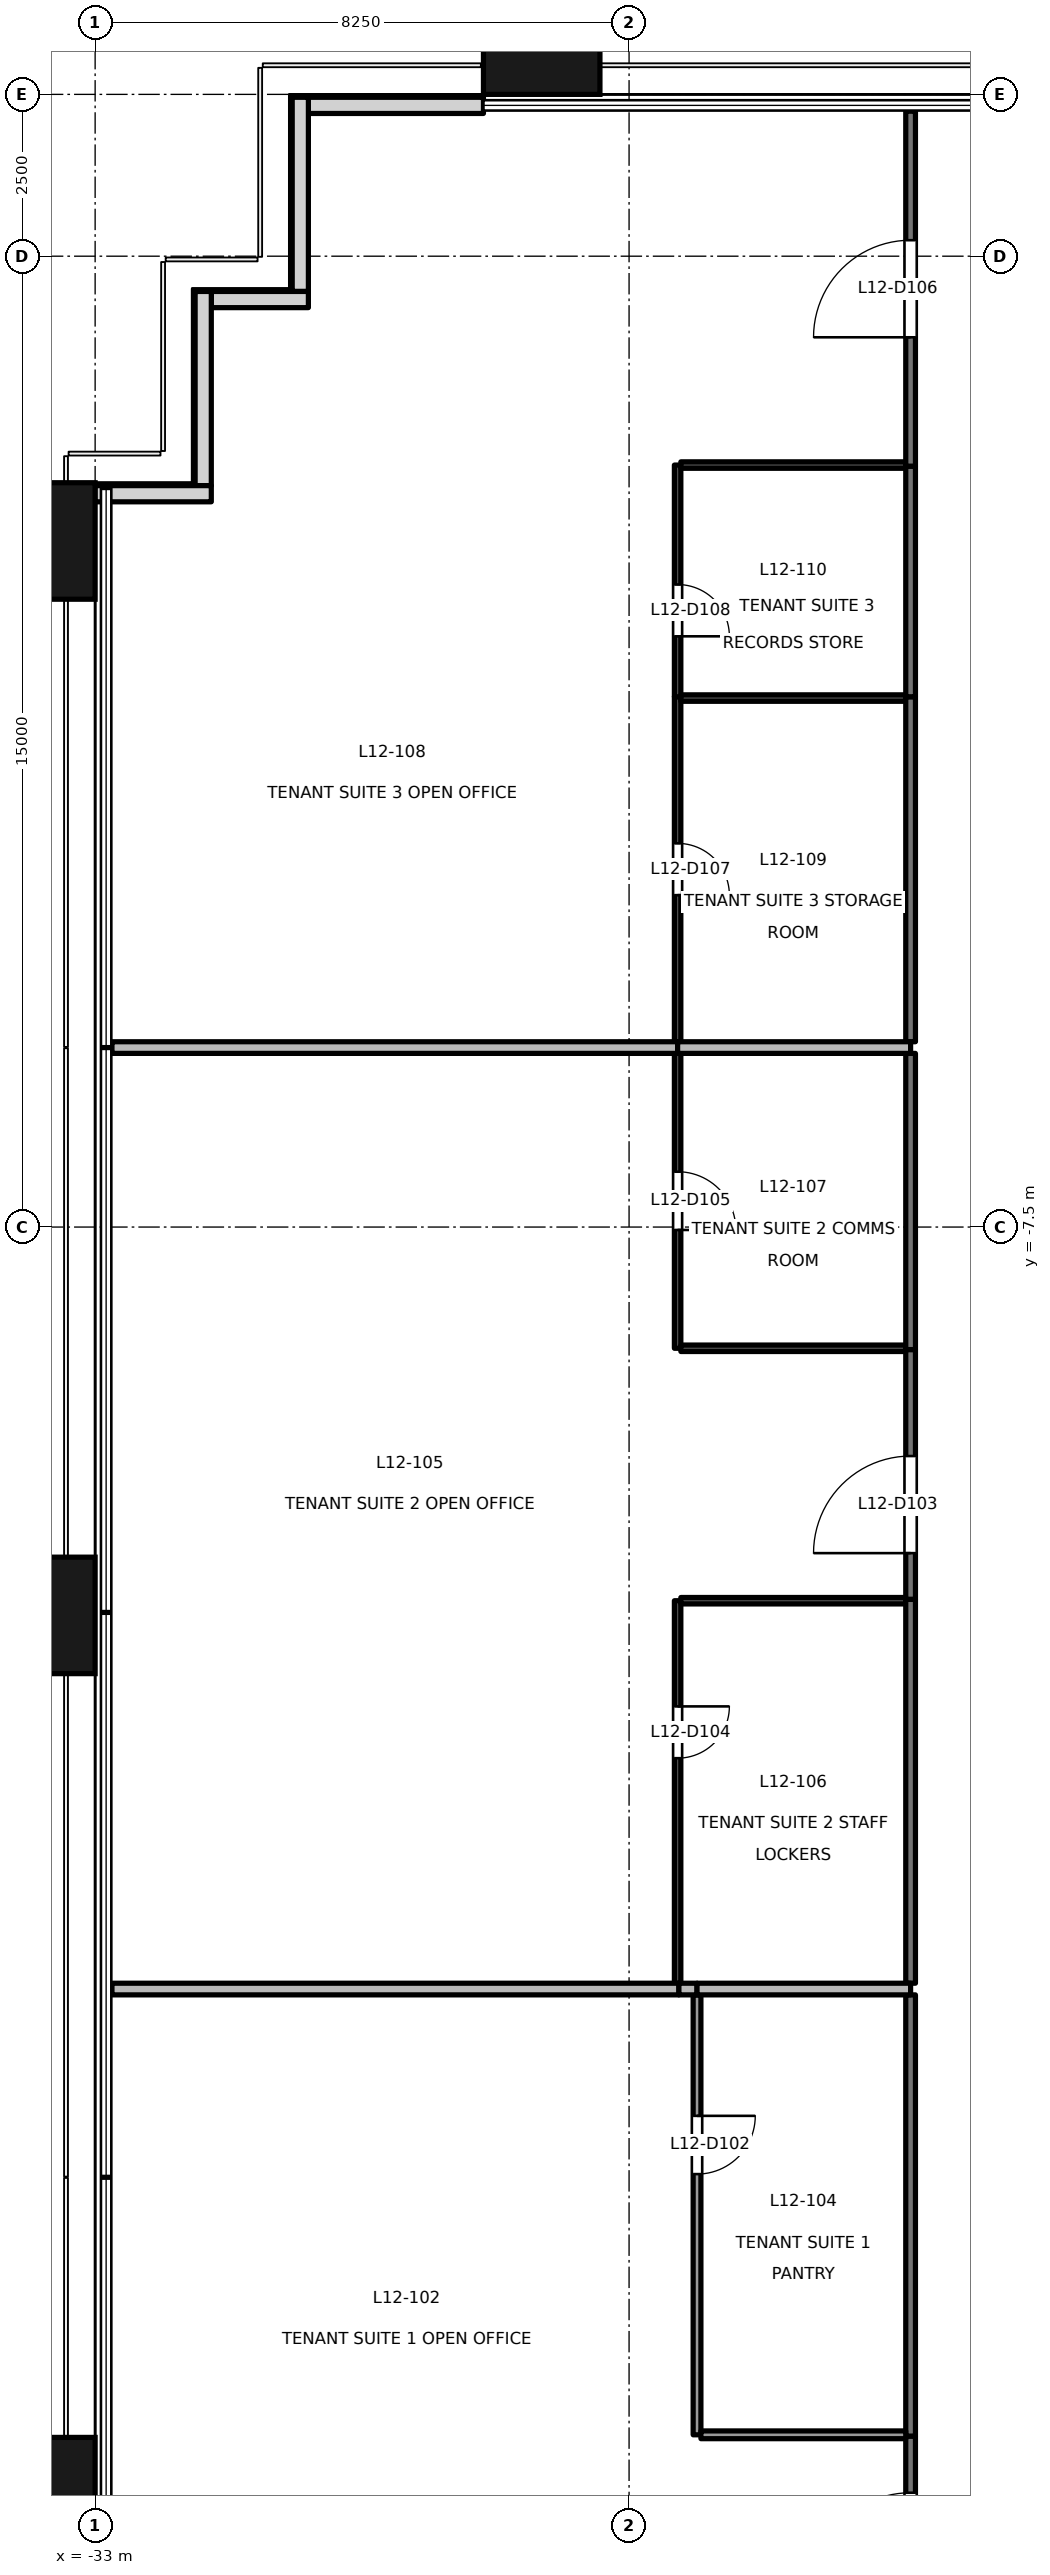
"""IFC4 building model, lengths in metres.
Left out: names, types, materials, properties, quantities, classifications, styles, units other than length and angle.
Written with IfcOpenShell. Run it as: python <this file> out.ifc"""

import sys

from ifc_helpers import new_model, si_unit, direction, frame, frame_2d, origin, origin_2d, place, context, subcontext, project, spatial, rectangle, extrude, element, fill, save


model = new_model("IFC4")
c1 = context("Model", 3, precision=1e-05, world=origin(), true_north=direction((0.0, 1.0)))
c2 = subcontext(c1, "Body", "Model", "MODEL_VIEW")
j1 = project(units=[si_unit("LENGTHUNIT", "METRE"), si_unit("PLANEANGLEUNIT", "RADIAN")], contexts=[c1])
p1 = place(None, origin())
s1 = spatial("IfcSite", under=j1, at=p1, CompositionType="ELEMENT")
p2 = place(p1, origin())
s2 = spatial("IfcBuilding", under=s1, at=p2, CompositionType="ELEMENT")
p3 = place(p2, frame((0.0, 0.0, 57.0)))
s3 = spatial("IfcBuildingStorey", under=s2, at=p3, CompositionType="ELEMENT", Elevation=57.0)
for number, where, z_axis, x_axis in (
    (1, (-33.9, -27.1, -0.2), (0.0, 0.0, 1.0), (0.0, 1.0, 0.0)),
    (2, (-33.9, -13.5, -0.2), (0.0, 0.0, 1.0), (0.0, 1.0, 0.0)),
    (3, (-33.9, 3.1, -0.2), (0.0, 0.0, 1.0), (0.0, 1.0, 0.0)),
    (4, (-26.1, 10.9, -0.2), (0.0, 0.0, 1.0), (1.0, 0.0, 0.0)),
):
    element("IfcColumn", number, at=place(p3, frame(where, z_axis=z_axis, x_axis=x_axis)), inside=s3, PredefinedType="COLUMN", context=c2, shape_type="SweptSolid", body=[
        extrude(rectangle(XDim=1.8, YDim=1.8, at=origin_2d()), origin(), (0.0, 0.0, 1.0), 4.1),
    ])
p4 = place(p3, frame((-27.0, 9.83, 0.0), z_axis=(0.0, 0.0, 1.0), x_axis=(-1.0, 0.0, 0.0)))
e5 = element("IfcWall", 5, at=p4, inside=s3, PredefinedType="SOLIDWALL", context=c2, shape_type="SweptSolid", body=[
    extrude(rectangle(XDim=2.705, YDim=0.25, at=frame_2d((1.353, 0.0))), origin(), (0.0, 0.0, 1.0), 3.9),
])
p5 = place(p3, frame((-29.83, 9.955, 0.0), z_axis=(0.0, 0.0, 1.0), x_axis=(0.0, -1.0, 0.0)))
e6 = element("IfcWall", 6, at=p5, inside=s3, PredefinedType="SOLIDWALL", context=c2, shape_type="SweptSolid", body=[
    extrude(rectangle(XDim=3.0, YDim=0.25, at=frame_2d((1.5, 0.0))), origin(), (0.0, 0.0, 1.0), 3.9),
])
p6 = place(p3, frame((-29.705, 6.83, 0.0), z_axis=(0.0, 0.0, 1.0), x_axis=(-1.0, 0.0, 0.0)))
e7 = element("IfcWall", 7, at=p6, inside=s3, PredefinedType="SOLIDWALL", context=c2, shape_type="SweptSolid", body=[
    extrude(rectangle(XDim=1.5, YDim=0.25, at=frame_2d((0.75, 0.0))), origin(), (0.0, 0.0, 1.0), 3.9),
])
p7 = place(p3, frame((-31.33, 6.955, 0.0), z_axis=(0.0, 0.0, 1.0), x_axis=(0.0, -1.0, 0.0)))
e8 = element("IfcWall", 8, at=p7, inside=s3, PredefinedType="SOLIDWALL", context=c2, shape_type="SweptSolid", body=[
    extrude(rectangle(XDim=3.0, YDim=0.25, at=frame_2d((1.5, 0.0))), origin(), (0.0, 0.0, 1.0), 3.9),
])
p8 = place(p3, frame((-31.205, 3.83, 0.0), z_axis=(0.0, 0.0, 1.0), x_axis=(-1.0, 0.0, 0.0)))
e9 = element("IfcWall", 9, at=p8, inside=s3, PredefinedType="SOLIDWALL", context=c2, shape_type="SweptSolid", body=[
    extrude(rectangle(XDim=1.8, YDim=0.25, at=frame_2d((0.9, 0.0))), origin(), (0.0, 0.0, 1.0), 3.9),
])
p9 = place(p3, frame((-20.4, -30.68, 0.0), z_axis=(0.0, 0.0, 1.0), x_axis=(0.0, 1.0, 0.0)))
e10 = element("IfcWall", 10, at=p9, inside=s3, PredefinedType="PARTITIONING", context=c2, shape_type="SweptSolid", body=[
    extrude(rectangle(XDim=4.5, YDim=0.15, at=frame_2d((2.25, 0.0))), origin(), (0.0, 0.0, 1.0), 3.3),
])
p10 = place(p9, frame((2.125, 0.0, 0.0)))
e11 = element("IfcOpeningElement", 11, at=p10, cuts=e10, PredefinedType="OPENING", context=c2, shape_type="SweptSolid", body=[
    extrude(rectangle(XDim=1.5, YDim=2.1, at=frame_2d((0.75, 1.05))), frame((0.0, 0.085, 0.0), z_axis=(0.0, -1.0, 0.0), x_axis=(1.0, 0.0, 0.0)), (0.0, 0.0, 1.0), 0.171),
])
p11 = place(p3, frame((-20.4, -26.18, 0.0), z_axis=(0.0, 0.0, 1.0), x_axis=(0.0, 1.0, 0.0)))
e12 = element("IfcWall", 12, at=p11, inside=s3, PredefinedType="PARTITIONING", context=c2, shape_type="SweptSolid", body=[
    extrude(rectangle(XDim=6.817, YDim=0.15, at=frame_2d((3.408, 0.0))), origin(), (0.0, 0.0, 1.0), 3.3),
])
p12 = place(p3, frame((-20.4, -13.253, 0.0), z_axis=(0.0, 0.0, 1.0), x_axis=(0.0, 1.0, 0.0)))
e13 = element("IfcWall", 13, at=p12, inside=s3, PredefinedType="PARTITIONING", context=c2, shape_type="SweptSolid", body=[
    extrude(rectangle(XDim=3.86, YDim=0.15, at=frame_2d((1.93, 0.0))), origin(), (0.0, 0.0, 1.0), 3.9),
])
p13 = place(p12, frame((0.715, 0.0, 0.0)))
e14 = element("IfcOpeningElement", 14, at=p13, cuts=e13, PredefinedType="OPENING", context=c2, shape_type="SweptSolid", body=[
    extrude(rectangle(XDim=1.5, YDim=2.1, at=frame_2d((0.75, 1.05))), frame((0.0, 0.085, 0.0), z_axis=(0.0, -1.0, 0.0), x_axis=(1.0, 0.0, 0.0)), (0.0, 0.0, 1.0), 0.171),
])
p14 = place(p3, frame((-20.4, -19.183, 0.0), z_axis=(0.0, 0.0, 1.0), x_axis=(0.0, 1.0, 0.0)))
e15 = element("IfcWall", 15, at=p14, inside=s3, PredefinedType="PARTITIONING", context=c2, shape_type="SweptSolid", body=[
    extrude(rectangle(XDim=5.93, YDim=0.15, at=frame_2d((2.965, 0.0))), origin(), (0.0, 0.0, 1.0), 3.3),
])
p15 = place(p3, frame((-20.4, -9.393, 0.0), z_axis=(0.0, 0.0, 1.0), x_axis=(0.0, 1.0, 0.0)))
e16 = element("IfcWall", 16, at=p15, inside=s3, PredefinedType="PARTITIONING", context=c2, shape_type="SweptSolid", body=[
    extrude(rectangle(XDim=4.576, YDim=0.15, at=frame_2d((2.288, 0.0))), origin(), (0.0, 0.0, 1.0), 3.3),
])
p16 = place(p3, frame((-20.4, 4.253, 0.0), z_axis=(0.0, 0.0, 1.0), x_axis=(0.0, 1.0, 0.0)))
e17 = element("IfcWall", 17, at=p16, inside=s3, PredefinedType="PARTITIONING", context=c2, shape_type="SweptSolid", body=[
    extrude(rectangle(XDim=5.487, YDim=0.15, at=frame_2d((2.744, 0.0))), origin(), (0.0, 0.0, 1.0), 3.9),
])
p17 = place(p16, frame((1.994, 0.0, 0.0)))
e18 = element("IfcOpeningElement", 18, at=p17, cuts=e17, PredefinedType="OPENING", context=c2, shape_type="SweptSolid", body=[
    extrude(rectangle(XDim=1.5, YDim=2.1, at=frame_2d((0.75, 1.05))), frame((0.0, 0.085, 0.0), z_axis=(0.0, -1.0, 0.0), x_axis=(1.0, 0.0, 0.0)), (0.0, 0.0, 1.0), 0.171),
])
p18 = place(p3, frame((-20.4, -4.637, 0.0), z_axis=(0.0, 0.0, 1.0), x_axis=(0.0, 1.0, 0.0)))
e19 = element("IfcWall", 19, at=p18, inside=s3, PredefinedType="PARTITIONING", context=c2, shape_type="SweptSolid", body=[
    extrude(rectangle(XDim=5.33, YDim=0.15, at=frame_2d((2.665, 0.0))), origin(), (0.0, 0.0, 1.0), 3.3),
])
p19 = place(p3, frame((-20.4, 0.693, 0.0), z_axis=(0.0, 0.0, 1.0), x_axis=(0.0, 1.0, 0.0)))
e20 = element("IfcWall", 20, at=p19, inside=s3, PredefinedType="PARTITIONING", context=c2, shape_type="SweptSolid", body=[
    extrude(rectangle(XDim=3.56, YDim=0.15, at=frame_2d((1.78, 0.0))), origin(), (0.0, 0.0, 1.0), 3.9),
])
p20 = place(p3, frame((-23.7, -19.363, 0.0), z_axis=(0.0, 0.0, 1.0), x_axis=(0.0, -1.0, 0.0)))
e21 = element("IfcWall", 21, at=p20, inside=s3, PredefinedType="PARTITIONING", context=c2, shape_type="SweptSolid", body=[
    extrude(rectangle(XDim=6.797, YDim=0.12, at=frame_2d((3.398, 0.0))), origin(), (0.0, 0.0, 1.0), 3.3),
])
p21 = place(p20, frame((1.869, 0.0, 0.0)))
e22 = element("IfcOpeningElement", 22, at=p21, cuts=e21, PredefinedType="OPENING", context=c2, shape_type="SweptSolid", body=[
    extrude(rectangle(XDim=0.9, YDim=2.1, at=frame_2d((0.45, 1.05))), frame((0.0, 0.071, 0.0), z_axis=(0.0, -1.0, 0.0), x_axis=(1.0, 0.0, 0.0)), (0.0, 0.0, 1.0), 0.141),
])
p22 = place(p3, frame((-23.64, -26.16, 0.0), z_axis=(0.0, 0.0, 1.0), x_axis=(1.0, 0.0, 0.0)))
e23 = element("IfcWall", 23, at=p22, inside=s3, PredefinedType="PARTITIONING", context=c2, shape_type="SweptSolid", body=[
    extrude(rectangle(XDim=3.165, YDim=0.12, at=frame_2d((1.583, 0.0))), origin(), (0.0, 0.0, 1.0), 3.9),
])
p23 = place(p3, frame((-32.74, -19.273, 0.0), z_axis=(0.0, 0.0, 1.0), x_axis=(1.0, 0.0, 0.0)))
e24 = element("IfcWall", 24, at=p23, inside=s3, PredefinedType="PARTITIONING", context=c2, shape_type="SweptSolid", body=[
    extrude(rectangle(XDim=8.76, YDim=0.18, at=frame_2d((4.38, 0.0))), origin(), (0.0, 0.0, 1.0), 3.9),
])
p24 = place(p3, frame((-23.98, -19.273, 0.0), z_axis=(0.0, 0.0, 1.0), x_axis=(1.0, 0.0, 0.0)))
e25 = element("IfcWall", 25, at=p24, inside=s3, PredefinedType="PARTITIONING", context=c2, shape_type="SweptSolid", body=[
    extrude(rectangle(XDim=0.28, YDim=0.18, at=frame_2d((0.14, 0.0))), origin(), (0.0, 0.0, 1.0), 3.9),
])
p25 = place(p3, frame((-23.7, -19.273, 0.0), z_axis=(0.0, 0.0, 1.0), x_axis=(1.0, 0.0, 0.0)))
e26 = element("IfcWall", 26, at=p25, inside=s3, PredefinedType="PARTITIONING", context=c2, shape_type="SweptSolid", body=[
    extrude(rectangle(XDim=3.3, YDim=0.18, at=frame_2d((1.65, 0.0))), origin(), (0.0, 0.0, 1.0), 3.9),
])
p26 = place(p3, frame((-24.0, -13.273, 0.0), z_axis=(0.0, 0.0, 1.0), x_axis=(0.0, -1.0, 0.0)))
e27 = element("IfcWall", 27, at=p26, inside=s3, PredefinedType="PARTITIONING", context=c2, shape_type="SweptSolid", body=[
    extrude(rectangle(XDim=5.91, YDim=0.1, at=frame_2d((2.955, 0.0))), origin(), (0.0, 0.0, 1.0), 3.3),
])
p27 = place(p26, frame((1.633, 0.0, 0.0)))
e28 = element("IfcOpeningElement", 28, at=p27, cuts=e27, PredefinedType="OPENING", context=c2, shape_type="SweptSolid", body=[
    extrude(rectangle(XDim=0.8, YDim=2.1, at=frame_2d((0.4, 1.05))), frame((0.0, 0.061, 0.0), z_axis=(0.0, -1.0, 0.0), x_axis=(1.0, 0.0, 0.0)), (0.0, 0.0, 1.0), 0.121),
])
p28 = place(p3, frame((-20.475, -13.273, 0.0), z_axis=(0.0, 0.0, 1.0), x_axis=(-1.0, 0.0, 0.0)))
e29 = element("IfcWall", 29, at=p28, inside=s3, PredefinedType="PARTITIONING", context=c2, shape_type="SweptSolid", body=[
    extrude(rectangle(XDim=3.475, YDim=0.1, at=frame_2d((1.737, 0.0))), origin(), (0.0, 0.0, 1.0), 3.9),
])
p29 = place(p3, frame((-24.0, -4.817, 0.0), z_axis=(0.0, 0.0, 1.0), x_axis=(0.0, -1.0, 0.0)))
e30 = element("IfcWall", 30, at=p29, inside=s3, PredefinedType="PARTITIONING", context=c2, shape_type="SweptSolid", body=[
    extrude(rectangle(XDim=4.556, YDim=0.1, at=frame_2d((2.278, 0.0))), origin(), (0.0, 0.0, 1.0), 3.3),
])
p30 = place(p29, frame((1.828, 0.0, 0.0)))
e31 = element("IfcOpeningElement", 31, at=p30, cuts=e30, PredefinedType="OPENING", context=c2, shape_type="SweptSolid", body=[
    extrude(rectangle(XDim=0.9, YDim=2.1, at=frame_2d((0.45, 1.05))), frame((0.0, 0.061, 0.0), z_axis=(0.0, -1.0, 0.0), x_axis=(1.0, 0.0, 0.0)), (0.0, 0.0, 1.0), 0.121),
])
p31 = place(p3, frame((-23.95, -9.373, 0.0), z_axis=(0.0, 0.0, 1.0), x_axis=(1.0, 0.0, 0.0)))
e32 = element("IfcWall", 32, at=p31, inside=s3, PredefinedType="PARTITIONING", context=c2, shape_type="SweptSolid", body=[
    extrude(rectangle(XDim=3.475, YDim=0.1, at=frame_2d((1.737, 0.0))), origin(), (0.0, 0.0, 1.0), 3.9),
])
p32 = place(p3, frame((-32.74, -4.727, 0.0), z_axis=(0.0, 0.0, 1.0), x_axis=(1.0, 0.0, 0.0)))
e33 = element("IfcWall", 33, at=p32, inside=s3, PredefinedType="PARTITIONING", context=c2, shape_type="SweptSolid", body=[
    extrude(rectangle(XDim=8.74, YDim=0.18, at=frame_2d((4.37, 0.0))), origin(), (0.0, 0.0, 1.0), 3.3),
])
p33 = place(p3, frame((-24.0, -4.727, 0.0), z_axis=(0.0, 0.0, 1.0), x_axis=(1.0, 0.0, 0.0)))
e34 = element("IfcWall", 34, at=p33, inside=s3, PredefinedType="PARTITIONING", context=c2, shape_type="SweptSolid", body=[
    extrude(rectangle(XDim=3.6, YDim=0.18, at=frame_2d((1.8, 0.0))), origin(), (0.0, 0.0, 1.0), 3.3),
])
p34 = place(p3, frame((-24.0, 0.693, 0.0), z_axis=(0.0, 0.0, 1.0), x_axis=(0.0, -1.0, 0.0)))
e35 = element("IfcWall", 35, at=p34, inside=s3, PredefinedType="PARTITIONING", context=c2, shape_type="SweptSolid", body=[
    extrude(rectangle(XDim=5.33, YDim=0.1, at=frame_2d((2.665, 0.0))), origin(), (0.0, 0.0, 1.0), 3.3),
])
p35 = place(p34, frame((2.265, 0.0, 0.0)))
e36 = element("IfcOpeningElement", 36, at=p35, cuts=e35, PredefinedType="OPENING", context=c2, shape_type="SweptSolid", body=[
    extrude(rectangle(XDim=0.8, YDim=2.1, at=frame_2d((0.4, 1.05))), frame((0.0, 0.061, 0.0), z_axis=(0.0, -1.0, 0.0), x_axis=(1.0, 0.0, 0.0)), (0.0, 0.0, 1.0), 0.121),
])
p36 = place(p3, frame((-24.0, 4.273, 0.0), z_axis=(0.0, 0.0, 1.0), x_axis=(0.0, -1.0, 0.0)))
e37 = element("IfcWall", 37, at=p36, inside=s3, PredefinedType="PARTITIONING", context=c2, shape_type="SweptSolid", body=[
    extrude(rectangle(XDim=3.58, YDim=0.1, at=frame_2d((1.79, 0.0))), origin(), (0.0, 0.0, 1.0), 3.9),
])
p37 = place(p36, frame((1.846, 0.0, 0.0)))
e38 = element("IfcOpeningElement", 38, at=p37, cuts=e37, PredefinedType="OPENING", context=c2, shape_type="SweptSolid", body=[
    extrude(rectangle(XDim=0.8, YDim=2.1, at=frame_2d((0.4, 1.05))), frame((0.0, 0.061, 0.0), z_axis=(0.0, -1.0, 0.0), x_axis=(1.0, 0.0, 0.0)), (0.0, 0.0, 1.0), 0.121),
])
for number, where, z_axis, x_axis in (
    (39, (-20.475, 4.273, 0.0), (0.0, 0.0, 1.0), (-1.0, 0.0, 0.0)),
    (40, (-23.95, 0.673, 0.0), (0.0, 0.0, 1.0), (1.0, 0.0, 0.0)),
):
    element("IfcWall", number, at=place(p3, frame(where, z_axis=z_axis, x_axis=x_axis)), inside=s3, PredefinedType="PARTITIONING", context=c2, shape_type="SweptSolid", body=[
        extrude(rectangle(XDim=3.475, YDim=0.1, at=frame_2d((1.737, 0.0))), origin(), (0.0, 0.0, 1.0), 3.9),
    ])
p38 = place(p10, origin())
e41 = element("IfcDoor", 41, at=p38, inside=s3, OperationType="DOUBLE_DOOR_SINGLE_SWING", PredefinedType="DOOR", context=c2, shape_type="SweptSolid", body=[
    extrude(rectangle(XDim=1.5, YDim=2.1, at=frame_2d((0.75, 1.05))), frame((0.0, 0.025, 0.0), z_axis=(0.0, -1.0, 0.0), x_axis=(1.0, 0.0, 0.0)), (0.0, 0.0, 1.0), 0.05),
])
fill(e11, e41)
p39 = place(p21, origin())
e42 = element("IfcDoor", 42, at=p39, inside=s3, OperationType="SINGLE_SWING_LEFT", PredefinedType="DOOR", context=c2, shape_type="SweptSolid", body=[
    extrude(rectangle(XDim=0.9, YDim=2.1, at=frame_2d((0.45, 1.05))), frame((0.0, 0.025, 0.0), z_axis=(0.0, -1.0, 0.0), x_axis=(1.0, 0.0, 0.0)), (0.0, 0.0, 1.0), 0.05),
])
fill(e22, e42)
p40 = place(p13, origin())
e43 = element("IfcDoor", 43, at=p40, inside=s3, OperationType="DOUBLE_DOOR_SINGLE_SWING", PredefinedType="DOOR", context=c2, shape_type="SweptSolid", body=[
    extrude(rectangle(XDim=1.5, YDim=2.1, at=frame_2d((0.75, 1.05))), frame((0.0, 0.025, 0.0), z_axis=(0.0, -1.0, 0.0), x_axis=(1.0, 0.0, 0.0)), (0.0, 0.0, 1.0), 0.05),
])
fill(e14, e43)
p41 = place(p27, origin())
e44 = element("IfcDoor", 44, at=p41, inside=s3, OperationType="SINGLE_SWING_LEFT", PredefinedType="DOOR", context=c2, shape_type="SweptSolid", body=[
    extrude(rectangle(XDim=0.8, YDim=2.1, at=frame_2d((0.4, 1.05))), frame((0.0, 0.025, 0.0), z_axis=(0.0, -1.0, 0.0), x_axis=(1.0, 0.0, 0.0)), (0.0, 0.0, 1.0), 0.05),
])
fill(e28, e44)
p42 = place(p30, origin())
e45 = element("IfcDoor", 45, at=p42, inside=s3, OperationType="SINGLE_SWING_RIGHT", PredefinedType="DOOR", context=c2, shape_type="SweptSolid", body=[
    extrude(rectangle(XDim=0.9, YDim=2.1, at=frame_2d((0.45, 1.05))), frame((0.0, 0.025, 0.0), z_axis=(0.0, -1.0, 0.0), x_axis=(1.0, 0.0, 0.0)), (0.0, 0.0, 1.0), 0.05),
])
fill(e31, e45)
p43 = place(p17, origin())
e46 = element("IfcDoor", 46, at=p43, inside=s3, OperationType="DOUBLE_DOOR_SINGLE_SWING", PredefinedType="DOOR", context=c2, shape_type="SweptSolid", body=[
    extrude(rectangle(XDim=1.5, YDim=2.1, at=frame_2d((0.75, 1.05))), frame((0.0, 0.025, 0.0), z_axis=(0.0, -1.0, 0.0), x_axis=(1.0, 0.0, 0.0)), (0.0, 0.0, 1.0), 0.05),
])
fill(e18, e46)
p44 = place(p35, origin())
e47 = element("IfcDoor", 47, at=p44, inside=s3, OperationType="SINGLE_SWING_RIGHT", PredefinedType="DOOR", context=c2, shape_type="SweptSolid", body=[
    extrude(rectangle(XDim=0.8, YDim=2.1, at=frame_2d((0.4, 1.05))), frame((0.0, 0.025, 0.0), z_axis=(0.0, -1.0, 0.0), x_axis=(1.0, 0.0, 0.0)), (0.0, 0.0, 1.0), 0.05),
])
fill(e36, e47)
p45 = place(p37, origin())
e48 = element("IfcDoor", 48, at=p45, inside=s3, OperationType="SINGLE_SWING_RIGHT", PredefinedType="DOOR", context=c2, shape_type="SweptSolid", body=[
    extrude(rectangle(XDim=0.8, YDim=2.1, at=frame_2d((0.4, 1.05))), frame((0.0, 0.025, 0.0), z_axis=(0.0, -1.0, 0.0), x_axis=(1.0, 0.0, 0.0)), (0.0, 0.0, 1.0), 0.05),
])
fill(e38, e48)
save(model, sys.argv[1])
